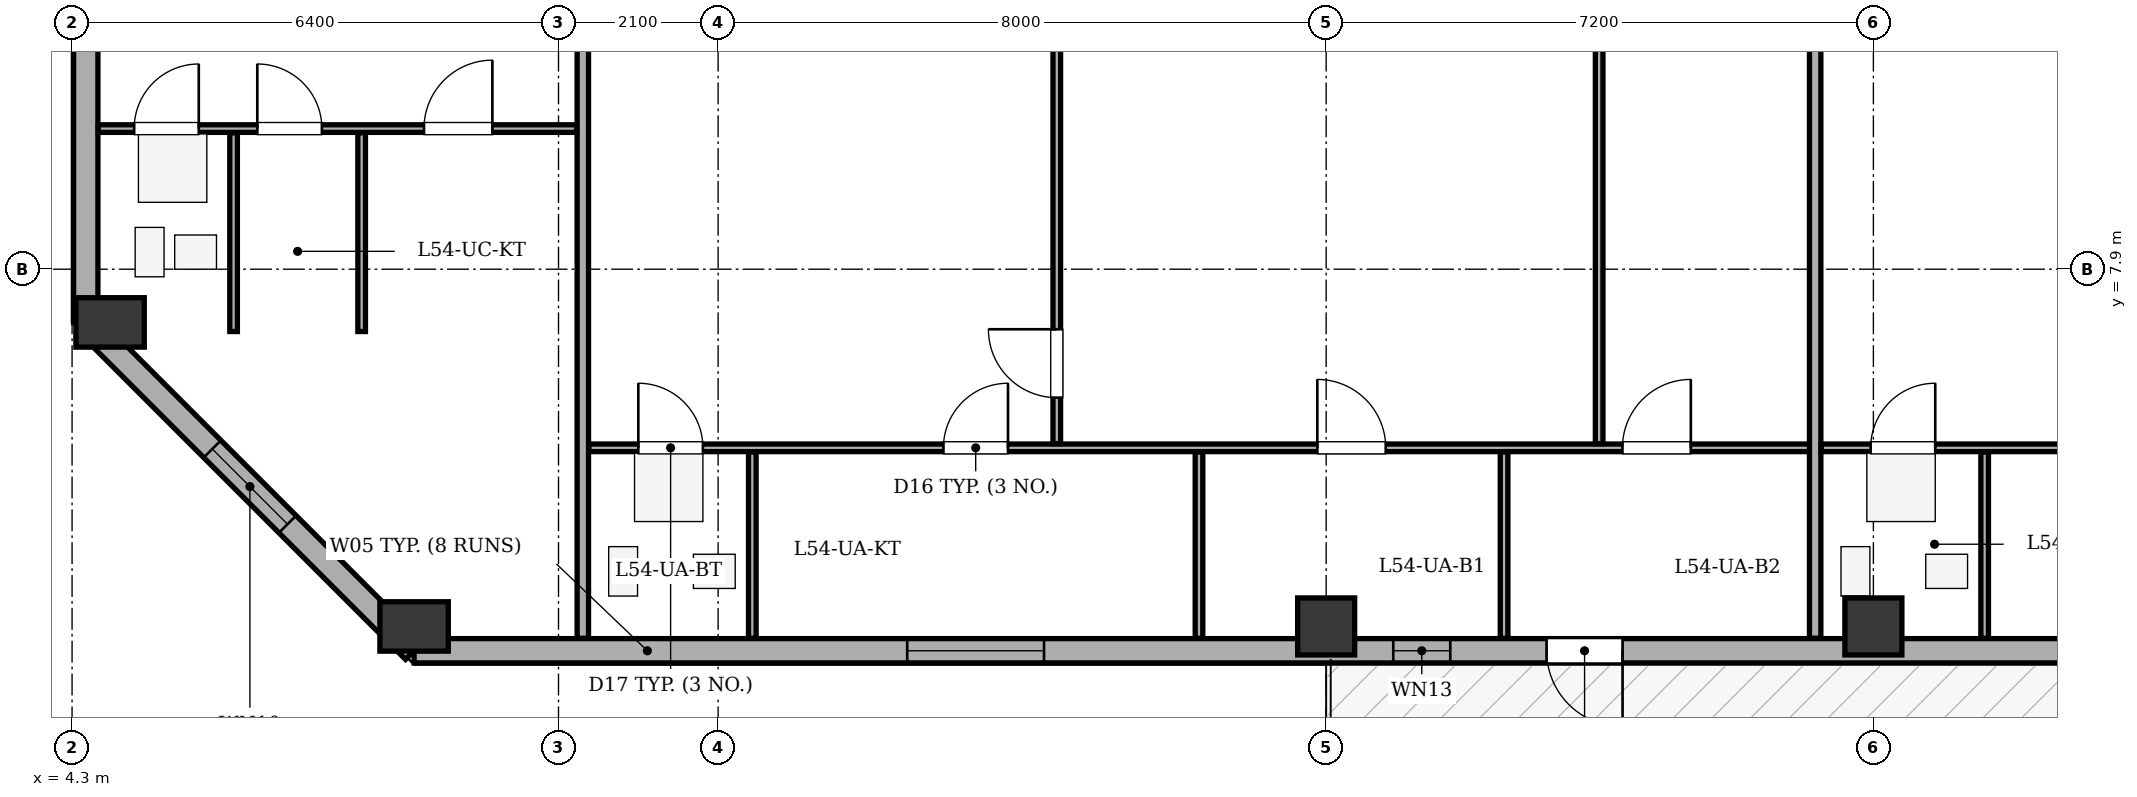
"""IFC4 building model, lengths in metres.
Left out: names, types, materials, properties, quantities, classifications, styles, units other than length and angle.
Written with IfcOpenShell. Run it as: python <this file> out.ifc"""

import sys

from ifc_helpers import new_model, si_unit, direction, frame, frame_2d, origin, origin_2d, place, context, subcontext, project, spatial, rectangle, extrude, element, fill, save


model = new_model("IFC4")
c1 = context("Model", 3, precision=1e-05, world=origin(), true_north=direction((0.0, 1.0)))
c2 = subcontext(c1, "Body", "Model", "MODEL_VIEW")
j1 = project(units=[si_unit("LENGTHUNIT", "METRE"), si_unit("PLANEANGLEUNIT", "RADIAN")], contexts=[c1])
p1 = place(None, origin())
s1 = spatial("IfcSite", under=j1, at=p1, CompositionType="ELEMENT")
p2 = place(p1, origin())
s2 = spatial("IfcBuilding", under=s1, at=p2, CompositionType="ELEMENT")
p3 = place(p2, frame((0.0, 0.0, 210.9)))
s3 = spatial("IfcBuildingStorey", under=s2, at=p3, CompositionType="ELEMENT", Elevation=210.9)
p4 = place(p3, frame((8.8, 3.2, 0.0), z_axis=(0.0, 0.0, 1.0), x_axis=(1.0, 0.0, 0.0)))
e1 = element("IfcColumn", 1, at=p4, inside=s3, PredefinedType="COLUMN", context=c2, shape_type="SweptSolid", body=[
    extrude(rectangle(XDim=0.65, YDim=0.9, at=origin_2d()), origin(), (0.0, 0.0, 1.0), 3.4),
])
for number, where, z_axis, x_axis in (
    (2, (20.8, 3.2, 0.0), (0.0, 0.0, 1.0), (1.0, 0.0, 0.0)),
    (3, (28.0, 3.2, 0.0), (0.0, 0.0, 1.0), (1.0, 0.0, 0.0)),
):
    element("IfcColumn", number, at=place(p3, frame(where, z_axis=z_axis, x_axis=x_axis)), inside=s3, PredefinedType="COLUMN", context=c2, shape_type="SweptSolid", body=[
        extrude(rectangle(XDim=0.75, YDim=0.75, at=origin_2d()), origin(), (0.0, 0.0, 1.0), 3.4),
    ])
p5 = place(p3, frame((4.8, 7.2, 0.0), z_axis=(0.0, 0.0, 1.0), x_axis=(1.0, 0.0, 0.0)))
e4 = element("IfcColumn", 4, at=p5, inside=s3, PredefinedType="COLUMN", context=c2, shape_type="SweptSolid", body=[
    extrude(rectangle(XDim=0.65, YDim=0.9, at=origin_2d()), origin(), (0.0, 0.0, 1.0), 3.4),
])
p6 = place(p3, frame((44.8, 2.88, 0.0), z_axis=(0.0, 0.0, 1.0), x_axis=(-1.0, 0.0, 0.0)))
e5 = element("IfcWall", 5, at=p6, inside=s3, PredefinedType="STANDARD", context=c2, shape_type="SweptSolid", body=[
    extrude(rectangle(XDim=36.0, YDim=0.32, at=frame_2d((18.0, 0.0))), origin(), (0.0, 0.0, 1.0), 2.725),
])
p7 = place(p6, frame((20.1, 0.0, 0.0)))
e6 = element("IfcOpeningElement", 6, at=p7, cuts=e5, PredefinedType="OPENING", context=c2, shape_type="SweptSolid", body=[
    extrude(rectangle(XDim=1.0, YDim=2.02, at=frame_2d((0.5, 1.01))), frame((0.0, 0.17, 0.0), z_axis=(0.0, -1.0, 0.0), x_axis=(1.0, 0.0, 0.0)), (0.0, 0.0, 1.0), 0.34),
])
p8 = place(p6, frame((1.416, 0.0, 0.75)))
e7 = element("IfcOpeningElement", 7, at=p8, cuts=e5, PredefinedType="OPENING", context=c2, shape_type="SweptSolid", body=[
    extrude(rectangle(XDim=1.8, YDim=1.7, at=frame_2d((0.9, 0.85))), frame((0.0, 0.17, 0.0), z_axis=(0.0, -1.0, 0.0), x_axis=(1.0, 0.0, 0.0)), (0.0, 0.0, 1.0), 0.34),
])
p9 = place(p6, frame((5.707, 0.0, 0.75)))
e8 = element("IfcOpeningElement", 8, at=p9, cuts=e5, PredefinedType="OPENING", context=c2, shape_type="SweptSolid", body=[
    extrude(rectangle(XDim=1.8, YDim=1.7, at=frame_2d((0.9, 0.85))), frame((0.0, 0.17, 0.0), z_axis=(0.0, -1.0, 0.0), x_axis=(1.0, 0.0, 0.0)), (0.0, 0.0, 1.0), 0.34),
])
p10 = place(p6, frame((11.63, 0.0, 0.75)))
e9 = element("IfcOpeningElement", 9, at=p10, cuts=e5, PredefinedType="OPENING", context=c2, shape_type="SweptSolid", body=[
    extrude(rectangle(XDim=1.8, YDim=1.7, at=frame_2d((0.9, 0.85))), frame((0.0, 0.17, 0.0), z_axis=(0.0, -1.0, 0.0), x_axis=(1.0, 0.0, 0.0)), (0.0, 0.0, 1.0), 0.34),
])
p11 = place(p6, frame((27.712, 0.0, 0.75)))
e10 = element("IfcOpeningElement", 10, at=p11, cuts=e5, PredefinedType="OPENING", context=c2, shape_type="SweptSolid", body=[
    extrude(rectangle(XDim=1.8, YDim=1.7, at=frame_2d((0.9, 0.85))), frame((0.0, 0.17, 0.0), z_axis=(0.0, -1.0, 0.0), x_axis=(1.0, 0.0, 0.0)), (0.0, 0.0, 1.0), 0.34),
])
p12 = place(p6, frame((22.367, 0.0, 0.75)))
e11 = element("IfcOpeningElement", 11, at=p12, cuts=e5, PredefinedType="OPENING", context=c2, shape_type="SweptSolid", body=[
    extrude(rectangle(XDim=0.75, YDim=1.45, at=frame_2d((0.375, 0.725))), frame((0.0, 0.17, 0.0), z_axis=(0.0, -1.0, 0.0), x_axis=(1.0, 0.0, 0.0)), (0.0, 0.0, 1.0), 0.34),
])
p13 = place(p3, frame((8.8, 2.88, 0.0), z_axis=(0.0, 0.0, 1.0), x_axis=(-0.707106781187, 0.707106781187, 0.0)))
e12 = element("IfcWall", 12, at=p13, inside=s3, PredefinedType="STANDARD", context=c2, shape_type="SweptSolid", body=[
    extrude(rectangle(XDim=6.11, YDim=0.32, at=frame_2d((3.055, 0.0))), origin(), (0.0, 0.0, 1.0), 2.725),
])
p14 = place(p13, frame((2.355, 0.0, 0.75)))
e13 = element("IfcOpeningElement", 13, at=p14, cuts=e12, PredefinedType="OPENING", context=c2, shape_type="SweptSolid", body=[
    extrude(rectangle(XDim=1.4, YDim=1.65, at=frame_2d((0.7, 0.825))), frame((0.0, 0.17, 0.0), z_axis=(0.0, -1.0, 0.0), x_axis=(1.0, 0.0, 0.0)), (0.0, 0.0, 1.0), 0.34),
])
p15 = place(p3, frame((4.48, 7.2, 0.0), z_axis=(0.0, 0.0, 1.0), x_axis=(0.0, 1.0, 0.0)))
e14 = element("IfcWall", 14, at=p15, inside=s3, PredefinedType="STANDARD", context=c2, shape_type="SweptSolid", body=[
    extrude(rectangle(XDim=27.8, YDim=0.32, at=frame_2d((13.9, 0.0))), origin(), (0.0, 0.0, 1.0), 2.725),
])
p16 = place(p15, frame((4.73, 0.0, 0.75)))
e15 = element("IfcOpeningElement", 15, at=p16, cuts=e14, PredefinedType="OPENING", context=c2, shape_type="SweptSolid", body=[
    extrude(rectangle(XDim=1.8, YDim=1.7, at=frame_2d((0.9, 0.85))), frame((0.0, 0.17, 0.0), z_axis=(0.0, -1.0, 0.0), x_axis=(1.0, 0.0, 0.0)), (0.0, 0.0, 1.0), 0.34),
])
p17 = place(p15, frame((9.295, 0.0, 0.75)))
e16 = element("IfcOpeningElement", 16, at=p17, cuts=e14, PredefinedType="OPENING", context=c2, shape_type="SweptSolid", body=[
    extrude(rectangle(XDim=2.2, YDim=1.7, at=frame_2d((1.1, 0.85))), frame((0.0, 0.17, 0.0), z_axis=(0.0, -1.0, 0.0), x_axis=(1.0, 0.0, 0.0)), (0.0, 0.0, 1.0), 0.34),
])
p18 = place(p15, frame((14.669, 0.0, 0.75)))
e17 = element("IfcOpeningElement", 17, at=p18, cuts=e14, PredefinedType="OPENING", context=c2, shape_type="SweptSolid", body=[
    extrude(rectangle(XDim=1.25, YDim=1.7, at=frame_2d((0.625, 0.85))), frame((0.0, 0.17, 0.0), z_axis=(0.0, -1.0, 0.0), x_axis=(1.0, 0.0, 0.0)), (0.0, 0.0, 1.0), 0.34),
])
p19 = place(p15, frame((18.649, 0.0, 0.75)))
e18 = element("IfcOpeningElement", 18, at=p19, cuts=e14, PredefinedType="OPENING", context=c2, shape_type="SweptSolid", body=[
    extrude(rectangle(XDim=1.8, YDim=1.7, at=frame_2d((0.9, 0.85))), frame((0.0, 0.17, 0.0), z_axis=(0.0, -1.0, 0.0), x_axis=(1.0, 0.0, 0.0)), (0.0, 0.0, 1.0), 0.34),
])
p20 = place(p15, frame((22.488, 0.0, 0.75)))
e19 = element("IfcOpeningElement", 19, at=p20, cuts=e14, PredefinedType="OPENING", context=c2, shape_type="SweptSolid", body=[
    extrude(rectangle(XDim=2.2, YDim=1.7, at=frame_2d((1.1, 0.85))), frame((0.0, 0.17, 0.0), z_axis=(0.0, -1.0, 0.0), x_axis=(1.0, 0.0, 0.0)), (0.0, 0.0, 1.0), 0.34),
])
p21 = place(p3, frame((11.02, 3.045, 0.0), z_axis=(0.0, 0.0, 1.0), x_axis=(0.0, 1.0, 0.0)))
e20 = element("IfcWall", 20, at=p21, inside=s3, PredefinedType="PARTITIONING", context=c2, shape_type="SweptSolid", body=[
    extrude(rectangle(XDim=15.255, YDim=0.15, at=frame_2d((7.627, 0.0))), origin(), (0.0, 0.0, 1.0), 3.1),
])
p22 = place(p3, frame((11.1, 5.55, 0.0), z_axis=(0.0, 0.0, 1.0), x_axis=(1.0, 0.0, 0.0)))
e21 = element("IfcWall", 21, at=p22, inside=s3, PredefinedType="PARTITIONING", context=c2, shape_type="SweptSolid", body=[
    extrude(rectangle(XDim=16.174, YDim=0.1, at=frame_2d((8.087, 0.0))), origin(), (0.0, 0.0, 1.0), 3.1),
])
p23 = place(p22, frame((0.65, 0.0, 0.0)))
e22 = element("IfcOpeningElement", 22, at=p23, cuts=e21, PredefinedType="OPENING", context=c2, shape_type="SweptSolid", body=[
    extrude(rectangle(XDim=0.85, YDim=2.05, at=frame_2d((0.425, 1.025))), frame((0.0, 0.06, 0.0), z_axis=(0.0, -1.0, 0.0), x_axis=(1.0, 0.0, 0.0)), (0.0, 0.0, 1.0), 0.12),
])
p24 = place(p22, frame((4.664, 0.0, 0.0)))
e23 = element("IfcOpeningElement", 23, at=p24, cuts=e21, PredefinedType="OPENING", context=c2, shape_type="SweptSolid", body=[
    extrude(rectangle(XDim=0.85, YDim=2.05, at=frame_2d((0.425, 1.025))), frame((0.0, 0.06, 0.0), z_axis=(0.0, -1.0, 0.0), x_axis=(1.0, 0.0, 0.0)), (0.0, 0.0, 1.0), 0.12),
])
p25 = place(p22, frame((9.584, 0.0, 0.0)))
e24 = element("IfcOpeningElement", 24, at=p25, cuts=e21, PredefinedType="OPENING", context=c2, shape_type="SweptSolid", body=[
    extrude(rectangle(XDim=0.9, YDim=2.05, at=frame_2d((0.45, 1.025))), frame((0.0, 0.06, 0.0), z_axis=(0.0, -1.0, 0.0), x_axis=(1.0, 0.0, 0.0)), (0.0, 0.0, 1.0), 0.12),
])
p26 = place(p22, frame((13.598, 0.0, 0.0)))
e25 = element("IfcOpeningElement", 25, at=p26, cuts=e21, PredefinedType="OPENING", context=c2, shape_type="SweptSolid", body=[
    extrude(rectangle(XDim=0.9, YDim=2.05, at=frame_2d((0.45, 1.025))), frame((0.0, 0.06, 0.0), z_axis=(0.0, -1.0, 0.0), x_axis=(1.0, 0.0, 0.0)), (0.0, 0.0, 1.0), 0.12),
])
p27 = place(p3, frame((24.392, 5.605, 0.0), z_axis=(0.0, 0.0, 1.0), x_axis=(0.0, 1.0, 0.0)))
e26 = element("IfcWall", 26, at=p27, inside=s3, PredefinedType="PARTITIONING", context=c2, shape_type="SweptSolid", body=[
    extrude(rectangle(XDim=12.695, YDim=0.1, at=frame_2d((6.348, 0.0))), origin(), (0.0, 0.0, 1.0), 3.1),
])
p28 = place(p27, frame((5.91, 0.0, 0.0)))
e27 = element("IfcOpeningElement", 27, at=p28, cuts=e26, PredefinedType="OPENING", context=c2, shape_type="SweptSolid", body=[
    extrude(rectangle(XDim=0.9, YDim=2.05, at=frame_2d((0.45, 1.025))), frame((0.0, 0.06, 0.0), z_axis=(0.0, -1.0, 0.0), x_axis=(1.0, 0.0, 0.0)), (0.0, 0.0, 1.0), 0.12),
])
p29 = place(p3, frame((17.256, 5.605, 0.0), z_axis=(0.0, 0.0, 1.0), x_axis=(0.0, 1.0, 0.0)))
e28 = element("IfcWall", 28, at=p29, inside=s3, PredefinedType="PARTITIONING", context=c2, shape_type="SweptSolid", body=[
    extrude(rectangle(XDim=12.695, YDim=0.1, at=frame_2d((6.348, 0.0))), origin(), (0.0, 0.0, 1.0), 3.1),
])
p30 = place(p29, frame((0.605, 0.0, 0.0)))
e29 = element("IfcOpeningElement", 29, at=p30, cuts=e28, PredefinedType="OPENING", context=c2, shape_type="SweptSolid", body=[
    extrude(rectangle(XDim=0.9, YDim=2.05, at=frame_2d((0.45, 1.025))), frame((0.0, 0.06, 0.0), z_axis=(0.0, -1.0, 0.0), x_axis=(1.0, 0.0, 0.0)), (0.0, 0.0, 1.0), 0.12),
])
for number, where, z_axis, x_axis in (
    (30, (13.25, 3.045, 0.0), (0.0, 0.0, 1.0), (0.0, 1.0, 0.0)),
    (31, (19.127, 3.045, 0.0), (0.0, 0.0, 1.0), (0.0, 1.0, 0.0)),
    (32, (23.141, 3.045, 0.0), (0.0, 0.0, 1.0), (0.0, 1.0, 0.0)),
):
    element("IfcWall", number, at=place(p3, frame(where, z_axis=z_axis, x_axis=x_axis)), inside=s3, PredefinedType="PARTITIONING", context=c2, shape_type="SweptSolid", body=[
        extrude(rectangle(XDim=2.45, YDim=0.1, at=frame_2d((1.225, 0.0))), origin(), (0.0, 0.0, 1.0), 3.1),
    ])
p31 = place(p3, frame((27.234, 3.045, 0.0), z_axis=(0.0, 0.0, 1.0), x_axis=(0.0, 1.0, 0.0)))
e33 = element("IfcWall", 33, at=p31, inside=s3, PredefinedType="PARTITIONING", context=c2, shape_type="SweptSolid", body=[
    extrude(rectangle(XDim=15.255, YDim=0.15, at=frame_2d((7.627, 0.0))), origin(), (0.0, 0.0, 1.0), 3.1),
])
p32 = place(p3, frame((27.314, 5.55, 0.0), z_axis=(0.0, 0.0, 1.0), x_axis=(1.0, 0.0, 0.0)))
e34 = element("IfcWall", 34, at=p32, inside=s3, PredefinedType="PARTITIONING", context=c2, shape_type="SweptSolid", body=[
    extrude(rectangle(XDim=17.526, YDim=0.1, at=frame_2d((8.763, 0.0))), origin(), (0.0, 0.0, 1.0), 3.1),
])
p33 = place(p32, frame((0.65, 0.0, 0.0)))
e35 = element("IfcOpeningElement", 35, at=p33, cuts=e34, PredefinedType="OPENING", context=c2, shape_type="SweptSolid", body=[
    extrude(rectangle(XDim=0.85, YDim=2.05, at=frame_2d((0.425, 1.025))), frame((0.0, 0.06, 0.0), z_axis=(0.0, -1.0, 0.0), x_axis=(1.0, 0.0, 0.0)), (0.0, 0.0, 1.0), 0.12),
])
p34 = place(p32, frame((5.001, 0.0, 0.0)))
e36 = element("IfcOpeningElement", 36, at=p34, cuts=e34, PredefinedType="OPENING", context=c2, shape_type="SweptSolid", body=[
    extrude(rectangle(XDim=0.85, YDim=2.05, at=frame_2d((0.425, 1.025))), frame((0.0, 0.06, 0.0), z_axis=(0.0, -1.0, 0.0), x_axis=(1.0, 0.0, 0.0)), (0.0, 0.0, 1.0), 0.12),
])
p35 = place(p32, frame((10.428, 0.0, 0.0)))
e37 = element("IfcOpeningElement", 37, at=p35, cuts=e34, PredefinedType="OPENING", context=c2, shape_type="SweptSolid", body=[
    extrude(rectangle(XDim=0.9, YDim=2.05, at=frame_2d((0.45, 1.025))), frame((0.0, 0.06, 0.0), z_axis=(0.0, -1.0, 0.0), x_axis=(1.0, 0.0, 0.0)), (0.0, 0.0, 1.0), 0.12),
])
p36 = place(p32, frame((14.78, 0.0, 0.0)))
e38 = element("IfcOpeningElement", 38, at=p36, cuts=e34, PredefinedType="OPENING", context=c2, shape_type="SweptSolid", body=[
    extrude(rectangle(XDim=0.9, YDim=2.05, at=frame_2d((0.45, 1.025))), frame((0.0, 0.06, 0.0), z_axis=(0.0, -1.0, 0.0), x_axis=(1.0, 0.0, 0.0)), (0.0, 0.0, 1.0), 0.12),
])
p37 = place(p3, frame((29.464, 3.045, 0.0), z_axis=(0.0, 0.0, 1.0), x_axis=(0.0, 1.0, 0.0)))
e39 = element("IfcWall", 39, at=p37, inside=s3, PredefinedType="PARTITIONING", context=c2, shape_type="SweptSolid", body=[
    extrude(rectangle(XDim=2.45, YDim=0.1, at=frame_2d((1.225, 0.0))), origin(), (0.0, 0.0, 1.0), 3.1),
])
p38 = place(p3, frame((4.645, 9.75, 0.0), z_axis=(0.0, 0.0, 1.0), x_axis=(1.0, 0.0, 0.0)))
e40 = element("IfcWall", 40, at=p38, inside=s3, PredefinedType="PARTITIONING", context=c2, shape_type="SweptSolid", body=[
    extrude(rectangle(XDim=6.295, YDim=0.1, at=frame_2d((3.147, 0.0))), origin(), (0.0, 0.0, 1.0), 3.1),
])
p39 = place(p38, frame((0.472, 0.0, 0.0)))
e41 = element("IfcOpeningElement", 41, at=p39, cuts=e40, PredefinedType="OPENING", context=c2, shape_type="SweptSolid", body=[
    extrude(rectangle(XDim=0.85, YDim=2.05, at=frame_2d((0.425, 1.025))), frame((0.0, 0.06, 0.0), z_axis=(0.0, -1.0, 0.0), x_axis=(1.0, 0.0, 0.0)), (0.0, 0.0, 1.0), 0.12),
])
p40 = place(p38, frame((2.092, 0.0, 0.0)))
e42 = element("IfcOpeningElement", 42, at=p40, cuts=e40, PredefinedType="OPENING", context=c2, shape_type="SweptSolid", body=[
    extrude(rectangle(XDim=0.85, YDim=2.05, at=frame_2d((0.425, 1.025))), frame((0.0, 0.06, 0.0), z_axis=(0.0, -1.0, 0.0), x_axis=(1.0, 0.0, 0.0)), (0.0, 0.0, 1.0), 0.12),
])
p41 = place(p38, frame((4.285, 0.0, 0.0)))
e43 = element("IfcOpeningElement", 43, at=p41, cuts=e40, PredefinedType="OPENING", context=c2, shape_type="SweptSolid", body=[
    extrude(rectangle(XDim=0.9, YDim=2.05, at=frame_2d((0.45, 1.025))), frame((0.0, 0.06, 0.0), z_axis=(0.0, -1.0, 0.0), x_axis=(1.0, 0.0, 0.0)), (0.0, 0.0, 1.0), 0.12),
])
for number, where, z_axis, x_axis in (
    (44, (6.425, 7.08, 0.0), (0.0, 0.0, 1.0), (0.0, 1.0, 0.0)),
    (45, (8.11, 7.08, 0.0), (0.0, 0.0, 1.0), (0.0, 1.0, 0.0)),
):
    element("IfcWall", number, at=place(p3, frame(where, z_axis=z_axis, x_axis=x_axis)), inside=s3, PredefinedType="PARTITIONING", context=c2, shape_type="SweptSolid", body=[
        extrude(rectangle(XDim=2.615, YDim=0.1, at=frame_2d((1.308, 0.0))), origin(), (0.0, 0.0, 1.0), 3.1),
    ])
p42 = place(p7, origin())
e46 = element("IfcDoor", 46, at=p42, inside=s3, OperationType="SINGLE_SWING_LEFT", PredefinedType="DOOR", context=c2, shape_type="SweptSolid", body=[
    extrude(rectangle(XDim=1.0, YDim=2.02, at=frame_2d((0.5, 1.01))), frame((0.0, 0.025, 0.0), z_axis=(0.0, -1.0, 0.0), x_axis=(1.0, 0.0, 0.0)), (0.0, 0.0, 1.0), 0.05),
])
fill(e6, e46)
p43 = place(p11, origin())
e47 = element("IfcWindow", 47, at=p43, inside=s3, PartitioningType="SINGLE_PANEL", PredefinedType="WINDOW", context=c2, shape_type="SweptSolid", body=[
    extrude(rectangle(XDim=1.8, YDim=1.7, at=frame_2d((0.9, 0.85))), frame((0.0, -0.01, 0.0), z_axis=(0.0, -1.0, 0.0), x_axis=(1.0, 0.0, 0.0)), (0.0, 0.0, 1.0), 0.06),
])
fill(e10, e47)
p44 = place(p12, origin())
e48 = element("IfcWindow", 48, at=p44, inside=s3, PartitioningType="SINGLE_PANEL", PredefinedType="WINDOW", context=c2, shape_type="SweptSolid", body=[
    extrude(rectangle(XDim=0.75, YDim=1.45, at=frame_2d((0.375, 0.725))), frame((0.0, -0.01, 0.0), z_axis=(0.0, -1.0, 0.0), x_axis=(1.0, 0.0, 0.0)), (0.0, 0.0, 1.0), 0.06),
])
fill(e11, e48)
p45 = place(p14, origin())
e49 = element("IfcWindow", 49, at=p45, inside=s3, PartitioningType="SINGLE_PANEL", PredefinedType="WINDOW", context=c2, shape_type="SweptSolid", body=[
    extrude(rectangle(XDim=1.4, YDim=1.65, at=frame_2d((0.7, 0.825))), frame((0.0, -0.01, 0.0), z_axis=(0.0, -1.0, 0.0), x_axis=(1.0, 0.0, 0.0)), (0.0, 0.0, 1.0), 0.06),
])
fill(e13, e49)
p46 = place(p30, origin())
e50 = element("IfcDoor", 50, at=p46, inside=s3, OperationType="SINGLE_SWING_RIGHT", PredefinedType="DOOR", context=c2, shape_type="SweptSolid", body=[
    extrude(rectangle(XDim=0.9, YDim=2.05, at=frame_2d((0.45, 1.025))), frame((0.0, 0.025, 0.0), z_axis=(0.0, -1.0, 0.0), x_axis=(1.0, 0.0, 0.0)), (0.0, 0.0, 1.0), 0.05),
])
fill(e29, e50)
p47 = place(p23, origin())
e51 = element("IfcDoor", 51, at=p47, inside=s3, OperationType="SINGLE_SWING_LEFT", PredefinedType="DOOR", context=c2, shape_type="SweptSolid", body=[
    extrude(rectangle(XDim=0.85, YDim=2.05, at=frame_2d((0.425, 1.025))), frame((0.0, 0.025, 0.0), z_axis=(0.0, -1.0, 0.0), x_axis=(1.0, 0.0, 0.0)), (0.0, 0.0, 1.0), 0.05),
])
fill(e22, e51)
p48 = place(p24, origin())
e52 = element("IfcDoor", 52, at=p48, inside=s3, OperationType="SINGLE_SWING_RIGHT", PredefinedType="DOOR", context=c2, shape_type="SweptSolid", body=[
    extrude(rectangle(XDim=0.85, YDim=2.05, at=frame_2d((0.425, 1.025))), frame((0.0, 0.025, 0.0), z_axis=(0.0, -1.0, 0.0), x_axis=(1.0, 0.0, 0.0)), (0.0, 0.0, 1.0), 0.05),
])
fill(e23, e52)
p49 = place(p25, origin())
e53 = element("IfcDoor", 53, at=p49, inside=s3, OperationType="SINGLE_SWING_LEFT", PredefinedType="DOOR", context=c2, shape_type="SweptSolid", body=[
    extrude(rectangle(XDim=0.9, YDim=2.05, at=frame_2d((0.45, 1.025))), frame((0.0, 0.025, 0.0), z_axis=(0.0, -1.0, 0.0), x_axis=(1.0, 0.0, 0.0)), (0.0, 0.0, 1.0), 0.05),
])
fill(e24, e53)
p50 = place(p26, origin())
e54 = element("IfcDoor", 54, at=p50, inside=s3, OperationType="SINGLE_SWING_RIGHT", PredefinedType="DOOR", context=c2, shape_type="SweptSolid", body=[
    extrude(rectangle(XDim=0.9, YDim=2.05, at=frame_2d((0.45, 1.025))), frame((0.0, 0.025, 0.0), z_axis=(0.0, -1.0, 0.0), x_axis=(1.0, 0.0, 0.0)), (0.0, 0.0, 1.0), 0.05),
])
fill(e25, e54)
p51 = place(p33, origin())
e55 = element("IfcDoor", 55, at=p51, inside=s3, OperationType="SINGLE_SWING_RIGHT", PredefinedType="DOOR", context=c2, shape_type="SweptSolid", body=[
    extrude(rectangle(XDim=0.85, YDim=2.05, at=frame_2d((0.425, 1.025))), frame((0.0, 0.025, 0.0), z_axis=(0.0, -1.0, 0.0), x_axis=(1.0, 0.0, 0.0)), (0.0, 0.0, 1.0), 0.05),
])
fill(e35, e55)
p52 = place(p39, origin())
e56 = element("IfcDoor", 56, at=p52, inside=s3, OperationType="SINGLE_SWING_RIGHT", PredefinedType="DOOR", context=c2, shape_type="SweptSolid", body=[
    extrude(rectangle(XDim=0.85, YDim=2.05, at=frame_2d((0.425, 1.025))), frame((0.0, 0.025, 0.0), z_axis=(0.0, -1.0, 0.0), x_axis=(1.0, 0.0, 0.0)), (0.0, 0.0, 1.0), 0.05),
])
fill(e41, e56)
p53 = place(p40, origin())
e57 = element("IfcDoor", 57, at=p53, inside=s3, OperationType="SINGLE_SWING_LEFT", PredefinedType="DOOR", context=c2, shape_type="SweptSolid", body=[
    extrude(rectangle(XDim=0.85, YDim=2.05, at=frame_2d((0.425, 1.025))), frame((0.0, 0.025, 0.0), z_axis=(0.0, -1.0, 0.0), x_axis=(1.0, 0.0, 0.0)), (0.0, 0.0, 1.0), 0.05),
])
fill(e42, e57)
p54 = place(p41, origin())
e58 = element("IfcDoor", 58, at=p54, inside=s3, OperationType="SINGLE_SWING_RIGHT", PredefinedType="DOOR", context=c2, shape_type="SweptSolid", body=[
    extrude(rectangle(XDim=0.9, YDim=2.05, at=frame_2d((0.45, 1.025))), frame((0.0, 0.025, 0.0), z_axis=(0.0, -1.0, 0.0), x_axis=(1.0, 0.0, 0.0)), (0.0, 0.0, 1.0), 0.05),
])
fill(e43, e58)
save(model, sys.argv[1])
